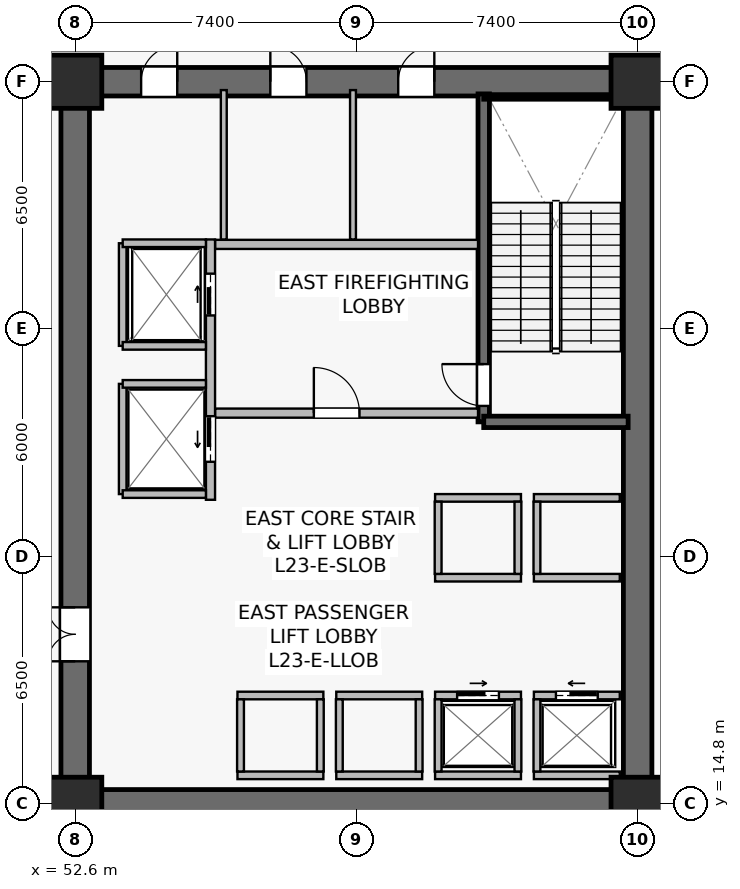
"""IFC4 building model, lengths in metres.
Left out: names, types, materials, properties, quantities, classifications, styles, units other than length and angle.
Written with IfcOpenShell. Run it as: python <this file> out.ifc"""

import sys

from ifc_helpers import new_model, si_unit, direction, frame, frame_2d, origin, origin_2d, place, context, subcontext, project, spatial, rectangle, extrude, source, transform, mapped, element, fill, save


model = new_model("IFC4")
c1 = context("Model", 3, precision=1e-05, world=origin(), true_north=direction((0.0, 1.0)))
c2 = subcontext(c1, "Body", "Model", "MODEL_VIEW")
j1 = project(units=[si_unit("LENGTHUNIT", "METRE"), si_unit("PLANEANGLEUNIT", "RADIAN")], contexts=[c1])
p1 = place(None, origin())
s1 = spatial("IfcSite", under=j1, at=p1, CompositionType="ELEMENT")
p2 = place(p1, origin())
s2 = spatial("IfcBuilding", under=s1, at=p2, CompositionType="ELEMENT")
p3 = place(p2, frame((0.0, 0.0, 94.9)))
s3 = spatial("IfcBuildingStorey", under=s2, at=p3, CompositionType="ELEMENT", Elevation=94.9)
p4 = place(p3, frame((52.225, 14.8, 0.0), z_axis=(0.0, 0.0, 1.0), x_axis=(1.0, 0.0, 0.0)))
e1 = element("IfcWall", 1, at=p4, inside=s3, PredefinedType="SHEAR", context=c2, shape_type="SweptSolid", body=[
    extrude(rectangle(XDim=15.55, YDim=0.75, at=frame_2d((7.775, 0.0))), origin(), (0.0, 0.0, 1.0), 5.09),
])
p5 = place(p3, frame((52.225, 33.8, 0.0), z_axis=(0.0, 0.0, 1.0), x_axis=(1.0, 0.0, 0.0)))
e2 = element("IfcWall", 2, at=p5, inside=s3, PredefinedType="SHEAR", context=c2, shape_type="SweptSolid", body=[
    extrude(rectangle(XDim=15.55, YDim=0.75, at=frame_2d((7.775, 0.0))), origin(), (0.0, 0.0, 1.0), 5.09),
])
p6 = place(p5, frame((8.875, 0.0, 0.0)))
e3 = element("IfcOpeningElement", 3, at=p6, cuts=e2, PredefinedType="OPENING", context=c2, shape_type="SweptSolid", body=[
    extrude(rectangle(XDim=0.95, YDim=2.15, at=frame_2d((0.475, 1.075))), frame((0.0, 0.385, 0.0), z_axis=(0.0, -1.0, 0.0), x_axis=(1.0, 0.0, 0.0)), (0.0, 0.0, 1.0), 0.77),
])
p7 = place(p5, frame((5.51, 0.0, 0.0)))
e4 = element("IfcOpeningElement", 4, at=p7, cuts=e2, PredefinedType="OPENING", context=c2, shape_type="SweptSolid", body=[
    extrude(rectangle(XDim=0.95, YDim=2.15, at=frame_2d((0.475, 1.075))), frame((0.0, 0.385, 0.0), z_axis=(0.0, -1.0, 0.0), x_axis=(1.0, 0.0, 0.0)), (0.0, 0.0, 1.0), 0.77),
])
p8 = place(p5, frame((2.11, 0.0, 0.0)))
e5 = element("IfcOpeningElement", 5, at=p8, cuts=e2, PredefinedType="OPENING", context=c2, shape_type="SweptSolid", body=[
    extrude(rectangle(XDim=0.95, YDim=2.15, at=frame_2d((0.475, 1.075))), frame((0.0, 0.385, 0.0), z_axis=(0.0, -1.0, 0.0), x_axis=(1.0, 0.0, 0.0)), (0.0, 0.0, 1.0), 0.77),
])
p9 = place(p3, frame((52.6, 15.175, 0.0), z_axis=(0.0, 0.0, 1.0), x_axis=(0.0, 1.0, 0.0)))
e6 = element("IfcWall", 6, at=p9, inside=s3, PredefinedType="SHEAR", context=c2, shape_type="SweptSolid", body=[
    extrude(rectangle(XDim=18.25, YDim=0.75, at=frame_2d((9.125, 0.0))), origin(), (0.0, 0.0, 1.0), 5.09),
])
p10 = place(p9, frame((3.375, 0.0, 0.0)))
e7 = element("IfcOpeningElement", 7, at=p10, cuts=e6, PredefinedType="OPENING", context=c2, shape_type="SweptSolid", body=[
    extrude(rectangle(XDim=1.42, YDim=2.2, at=frame_2d((0.71, 1.1))), frame((0.0, 0.385, 0.0), z_axis=(0.0, -1.0, 0.0), x_axis=(1.0, 0.0, 0.0)), (0.0, 0.0, 1.0), 0.77),
])
p11 = place(p3, frame((67.4, 15.175, 0.0), z_axis=(0.0, 0.0, 1.0), x_axis=(0.0, 1.0, 0.0)))
e8 = element("IfcWall", 8, at=p11, inside=s3, PredefinedType="SHEAR", context=c2, shape_type="SweptSolid", body=[
    extrude(rectangle(XDim=18.25, YDim=0.75, at=frame_2d((9.125, 0.0))), origin(), (0.0, 0.0, 1.0), 5.09),
])
p12 = place(p3, frame((63.35, 24.85, 0.0), z_axis=(0.0, 0.0, 1.0), x_axis=(0.0, 1.0, 0.0)))
e9 = element("IfcWall", 9, at=p12, inside=s3, PredefinedType="SHEAR", context=c2, shape_type="SweptSolid", body=[
    extrude(rectangle(XDim=8.63, YDim=0.3, at=frame_2d((4.315, 0.0))), origin(), (0.0, 0.0, 1.0), 5.09),
])
p13 = place(p12, frame((0.42, 0.0, 0.0)))
e10 = element("IfcOpeningElement", 10, at=p13, cuts=e9, PredefinedType="OPENING", context=c2, shape_type="SweptSolid", body=[
    extrude(rectangle(XDim=1.1, YDim=2.15, at=frame_2d((0.55, 1.075))), frame((0.0, 0.16, 0.0), z_axis=(0.0, -1.0, 0.0), x_axis=(1.0, 0.0, 0.0)), (0.0, 0.0, 1.0), 0.32),
])
p14 = place(p3, frame((63.35, 24.85, 0.0), z_axis=(0.0, 0.0, 1.0), x_axis=(1.0, 0.0, 0.0)))
e11 = element("IfcWall", 11, at=p14, inside=s3, PredefinedType="SHEAR", context=c2, shape_type="SweptSolid", body=[
    extrude(rectangle(XDim=3.8, YDim=0.3, at=frame_2d((1.9, 0.0))), origin(), (0.0, 0.0, 1.0), 5.09),
])
p15 = place(p3, frame((63.35, 33.4, 0.0), z_axis=(0.0, 0.0, 1.0), x_axis=(1.0, 0.0, 0.0)))
e12 = element("IfcWall", 12, at=p15, inside=s3, PredefinedType="SOLIDWALL", context=c2, shape_type="SweptSolid", body=[
    extrude(rectangle(XDim=3.72, YDim=0.12, at=frame_2d((1.86, 0.0))), origin(), (0.0, 0.0, 1.0), 5.09),
])
m1 = source(origin(), c2, "Body", "SweptSolid", [
    extrude(rectangle(XDim=1.4, YDim=1.4, at=origin_2d()), origin(), (0.0, 0.0, 1.0), 5.4),
])
for number, where, z_axis, x_axis in (
    (13, (52.6, 14.8, 0.0), (0.0, 0.0, 1.0), (1.0, 0.0, 0.0)),
    (14, (67.4, 14.8, 0.0), (0.0, 0.0, 1.0), (1.0, 0.0, 0.0)),
    (15, (52.6, 33.8, 0.0), (0.0, 0.0, 1.0), (1.0, 0.0, 0.0)),
    (16, (67.4, 33.8, 0.0), (0.0, 0.0, 1.0), (1.0, 0.0, 0.0)),
):
    element("IfcColumn", number, at=place(p3, frame(where, z_axis=z_axis, x_axis=x_axis)), inside=s3, PredefinedType="COLUMN", context=c2, shape_type="MappedRepresentation", body=[
        mapped(m1, transform((0.0, 0.0, 0.0), scale=1.0)),
    ])
p16 = place(p3, frame((56.28, 25.08, 0.0), z_axis=(0.0, 0.0, 1.0), x_axis=(1.0, 0.0, 0.0)))
e17 = element("IfcWall", 17, at=p16, inside=s3, PredefinedType="SOLIDWALL", context=c2, shape_type="SweptSolid", body=[
    extrude(rectangle(XDim=6.92, YDim=0.24, at=frame_2d((3.46, 0.0))), origin(), (0.0, 0.0, 1.0), 4.425),
])
p17 = place(p16, frame((2.6, 0.0, 0.0)))
e18 = element("IfcOpeningElement", 18, at=p17, cuts=e17, PredefinedType="OPENING", context=c2, shape_type="SweptSolid", body=[
    extrude(rectangle(XDim=1.2, YDim=2.16, at=frame_2d((0.6, 1.08))), frame((0.0, 0.13, 0.0), z_axis=(0.0, -1.0, 0.0), x_axis=(1.0, 0.0, 0.0)), (0.0, 0.0, 1.0), 0.26),
])
p18 = place(p3, frame((56.28, 29.52, 0.0), z_axis=(0.0, 0.0, 1.0), x_axis=(1.0, 0.0, 0.0)))
e19 = element("IfcWall", 19, at=p18, inside=s3, PredefinedType="SOLIDWALL", context=c2, shape_type="SweptSolid", body=[
    extrude(rectangle(XDim=6.92, YDim=0.24, at=frame_2d((3.46, 0.0))), origin(), (0.0, 0.0, 1.0), 4.425),
])
p19 = place(p3, frame((56.16, 22.8, 0.0), z_axis=(0.0, 0.0, 1.0), x_axis=(0.0, 1.0, 0.0)))
e20 = element("IfcWall", 20, at=p19, inside=s3, PredefinedType="SOLIDWALL", context=c2, shape_type="SweptSolid", body=[
    extrude(rectangle(XDim=6.85, YDim=0.24, at=frame_2d((3.425, 0.0))), origin(), (0.0, 0.0, 1.0), 4.175),
])
p20 = place(p19, frame((4.85, 0.0, 0.0)))
e21 = element("IfcOpeningElement", 21, at=p20, cuts=e20, PredefinedType="OPENING", context=c2, shape_type="SweptSolid", body=[
    extrude(rectangle(XDim=1.1, YDim=2.22, at=frame_2d((0.55, 1.11))), frame((0.0, 0.13, 0.0), z_axis=(0.0, -1.0, 0.0), x_axis=(1.0, 0.0, 0.0)), (0.0, 0.0, 1.0), 0.26),
])
p21 = place(p19, frame((1.0, 0.0, 0.0)))
e22 = element("IfcOpeningElement", 22, at=p21, cuts=e20, PredefinedType="OPENING", context=c2, shape_type="SweptSolid", body=[
    extrude(rectangle(XDim=1.2, YDim=2.22, at=frame_2d((0.6, 1.11))), frame((0.0, 0.13, 0.0), z_axis=(0.0, -1.0, 0.0), x_axis=(1.0, 0.0, 0.0)), (0.0, 0.0, 1.0), 0.26),
])
p22 = place(p3, frame((64.67, 17.65, 0.0), z_axis=(0.0, 0.0, 1.0), x_axis=(1.0, 0.0, 0.0)))
e23 = element("IfcWall", 23, at=p22, inside=s3, PredefinedType="SOLIDWALL", context=c2, shape_type="SweptSolid", body=[
    extrude(rectangle(XDim=2.26, YDim=0.2, at=frame_2d((1.13, 0.0))), origin(), (0.0, 0.0, 1.0), 5.09),
])
p23 = place(p22, frame((0.58, 0.0, 0.0)))
e24 = element("IfcOpeningElement", 24, at=p23, cuts=e23, PredefinedType="OPENING", context=c2, shape_type="SweptSolid", body=[
    extrude(rectangle(XDim=1.1, YDim=2.22, at=frame_2d((0.55, 1.11))), frame((0.0, 0.11, 0.0), z_axis=(0.0, -1.0, 0.0), x_axis=(1.0, 0.0, 0.0)), (0.0, 0.0, 1.0), 0.22),
])
p24 = place(p3, frame((64.67, 15.55, 0.0), z_axis=(0.0, 0.0, 1.0), x_axis=(1.0, 0.0, 0.0)))
e25 = element("IfcWall", 25, at=p24, inside=s3, PredefinedType="SOLIDWALL", context=c2, shape_type="SweptSolid", body=[
    extrude(rectangle(XDim=2.26, YDim=0.2, at=frame_2d((1.13, 0.0))), origin(), (0.0, 0.0, 1.0), 5.09),
])
p25 = place(p3, frame((64.75, 15.65, 0.0), z_axis=(0.0, 0.0, 1.0), x_axis=(0.0, 1.0, 0.0)))
e26 = element("IfcWall", 26, at=p25, inside=s3, PredefinedType="SOLIDWALL", context=c2, shape_type="SweptSolid", body=[
    extrude(rectangle(XDim=1.9, YDim=0.18, at=frame_2d((0.95, 0.0))), origin(), (0.0, 0.0, 1.0), 5.09),
])
p26 = place(p3, frame((62.07, 17.65, 0.0), z_axis=(0.0, 0.0, 1.0), x_axis=(1.0, 0.0, 0.0)))
e27 = element("IfcWall", 27, at=p26, inside=s3, PredefinedType="SOLIDWALL", context=c2, shape_type="SweptSolid", body=[
    extrude(rectangle(XDim=2.26, YDim=0.2, at=frame_2d((1.13, 0.0))), origin(), (0.0, 0.0, 1.0), 5.09),
])
p27 = place(p26, frame((0.58, 0.0, 0.0)))
e28 = element("IfcOpeningElement", 28, at=p27, cuts=e27, PredefinedType="OPENING", context=c2, shape_type="SweptSolid", body=[
    extrude(rectangle(XDim=1.1, YDim=2.22, at=frame_2d((0.55, 1.11))), frame((0.0, 0.11, 0.0), z_axis=(0.0, -1.0, 0.0), x_axis=(1.0, 0.0, 0.0)), (0.0, 0.0, 1.0), 0.22),
])
p28 = place(p3, frame((62.07, 15.55, 0.0), z_axis=(0.0, 0.0, 1.0), x_axis=(1.0, 0.0, 0.0)))
e29 = element("IfcWall", 29, at=p28, inside=s3, PredefinedType="SOLIDWALL", context=c2, shape_type="SweptSolid", body=[
    extrude(rectangle(XDim=2.26, YDim=0.2, at=frame_2d((1.13, 0.0))), origin(), (0.0, 0.0, 1.0), 5.09),
])
for number, where, z_axis, x_axis in (
    (30, (62.15, 15.65, 0.0), (0.0, 0.0, 1.0), (0.0, 1.0, 0.0)),
    (31, (64.25, 15.65, 0.0), (0.0, 0.0, 1.0), (0.0, 1.0, 0.0)),
):
    element("IfcWall", number, at=place(p3, frame(where, z_axis=z_axis, x_axis=x_axis)), inside=s3, PredefinedType="SOLIDWALL", context=c2, shape_type="SweptSolid", body=[
        extrude(rectangle(XDim=1.9, YDim=0.18, at=frame_2d((0.95, 0.0))), origin(), (0.0, 0.0, 1.0), 5.09),
    ])
for number, where, z_axis, x_axis in (
    (32, (59.47, 17.65, 0.0), (0.0, 0.0, 1.0), (1.0, 0.0, 0.0)),
    (33, (59.47, 15.55, 0.0), (0.0, 0.0, 1.0), (1.0, 0.0, 0.0)),
):
    element("IfcWall", number, at=place(p3, frame(where, z_axis=z_axis, x_axis=x_axis)), inside=s3, PredefinedType="SOLIDWALL", context=c2, shape_type="SweptSolid", body=[
        extrude(rectangle(XDim=2.26, YDim=0.2, at=frame_2d((1.13, 0.0))), origin(), (0.0, 0.0, 1.0), 4.425),
    ])
for number, where, z_axis, x_axis in (
    (34, (59.55, 15.65, 0.0), (0.0, 0.0, 1.0), (0.0, 1.0, 0.0)),
    (35, (61.65, 15.65, 0.0), (0.0, 0.0, 1.0), (0.0, 1.0, 0.0)),
):
    element("IfcWall", number, at=place(p3, frame(where, z_axis=z_axis, x_axis=x_axis)), inside=s3, PredefinedType="SOLIDWALL", context=c2, shape_type="SweptSolid", body=[
        extrude(rectangle(XDim=1.9, YDim=0.18, at=frame_2d((0.95, 0.0))), origin(), (0.0, 0.0, 1.0), 5.09),
    ])
for number, where, z_axis, x_axis in (
    (36, (56.87, 17.65, 0.0), (0.0, 0.0, 1.0), (1.0, 0.0, 0.0)),
    (37, (56.87, 15.55, 0.0), (0.0, 0.0, 1.0), (1.0, 0.0, 0.0)),
):
    element("IfcWall", number, at=place(p3, frame(where, z_axis=z_axis, x_axis=x_axis)), inside=s3, PredefinedType="SOLIDWALL", context=c2, shape_type="SweptSolid", body=[
        extrude(rectangle(XDim=2.26, YDim=0.2, at=frame_2d((1.13, 0.0))), origin(), (0.0, 0.0, 1.0), 5.09),
    ])
for number, where, z_axis, x_axis in (
    (38, (56.95, 15.65, 0.0), (0.0, 0.0, 1.0), (0.0, 1.0, 0.0)),
    (39, (59.05, 15.65, 0.0), (0.0, 0.0, 1.0), (0.0, 1.0, 0.0)),
):
    element("IfcWall", number, at=place(p3, frame(where, z_axis=z_axis, x_axis=x_axis)), inside=s3, PredefinedType="SOLIDWALL", context=c2, shape_type="SweptSolid", body=[
        extrude(rectangle(XDim=1.9, YDim=0.18, at=frame_2d((0.95, 0.0))), origin(), (0.0, 0.0, 1.0), 5.09),
    ])
for number, where, z_axis, x_axis in (
    (40, (64.67, 20.75, 0.0), (0.0, 0.0, 1.0), (1.0, 0.0, 0.0)),
    (41, (64.67, 22.85, 0.0), (0.0, 0.0, 1.0), (1.0, 0.0, 0.0)),
):
    element("IfcWall", number, at=place(p3, frame(where, z_axis=z_axis, x_axis=x_axis)), inside=s3, PredefinedType="SOLIDWALL", context=c2, shape_type="SweptSolid", body=[
        extrude(rectangle(XDim=2.26, YDim=0.2, at=frame_2d((1.13, 0.0))), origin(), (0.0, 0.0, 1.0), 5.09),
    ])
p29 = place(p3, frame((64.75, 20.85, 0.0), z_axis=(0.0, 0.0, 1.0), x_axis=(0.0, 1.0, 0.0)))
e42 = element("IfcWall", 42, at=p29, inside=s3, PredefinedType="SOLIDWALL", context=c2, shape_type="SweptSolid", body=[
    extrude(rectangle(XDim=1.9, YDim=0.18, at=frame_2d((0.95, 0.0))), origin(), (0.0, 0.0, 1.0), 5.09),
])
for number, where, z_axis, x_axis in (
    (43, (62.07, 20.75, 0.0), (0.0, 0.0, 1.0), (1.0, 0.0, 0.0)),
    (44, (62.07, 22.85, 0.0), (0.0, 0.0, 1.0), (1.0, 0.0, 0.0)),
):
    element("IfcWall", number, at=place(p3, frame(where, z_axis=z_axis, x_axis=x_axis)), inside=s3, PredefinedType="SOLIDWALL", context=c2, shape_type="SweptSolid", body=[
        extrude(rectangle(XDim=2.26, YDim=0.2, at=frame_2d((1.13, 0.0))), origin(), (0.0, 0.0, 1.0), 5.09),
    ])
for number, where, z_axis, x_axis in (
    (45, (62.15, 20.85, 0.0), (0.0, 0.0, 1.0), (0.0, 1.0, 0.0)),
    (46, (64.25, 20.85, 0.0), (0.0, 0.0, 1.0), (0.0, 1.0, 0.0)),
):
    element("IfcWall", number, at=place(p3, frame(where, z_axis=z_axis, x_axis=x_axis)), inside=s3, PredefinedType="SOLIDWALL", context=c2, shape_type="SweptSolid", body=[
        extrude(rectangle(XDim=1.9, YDim=0.18, at=frame_2d((0.95, 0.0))), origin(), (0.0, 0.0, 1.0), 5.09),
    ])
p30 = place(p3, frame((53.85, 26.85, 0.0), z_axis=(0.0, 0.0, 1.0), x_axis=(0.0, 1.0, 0.0)))
e47 = element("IfcWall", 47, at=p30, inside=s3, PredefinedType="SOLIDWALL", context=c2, shape_type="SweptSolid", body=[
    extrude(rectangle(XDim=2.7, YDim=0.2, at=frame_2d((1.35, 0.0))), origin(), (0.0, 0.0, 1.0), 5.09),
])
p31 = place(p3, frame((53.85, 29.55, 0.0), z_axis=(0.0, 0.0, 1.0), x_axis=(1.0, 0.0, 0.0)))
e48 = element("IfcWall", 48, at=p31, inside=s3, PredefinedType="SOLIDWALL", context=c2, shape_type="SweptSolid", body=[
    extrude(rectangle(XDim=2.19, YDim=0.2, at=frame_2d((1.095, 0.0))), origin(), (0.0, 0.0, 1.0), 5.09),
])
p32 = place(p3, frame((53.85, 26.85, 0.0), z_axis=(0.0, 0.0, 1.0), x_axis=(1.0, 0.0, 0.0)))
e49 = element("IfcWall", 49, at=p32, inside=s3, PredefinedType="SOLIDWALL", context=c2, shape_type="SweptSolid", body=[
    extrude(rectangle(XDim=2.19, YDim=0.2, at=frame_2d((1.095, 0.0))), origin(), (0.0, 0.0, 1.0), 4.487),
])
p33 = place(p3, frame((53.85, 22.95, 0.0), z_axis=(0.0, 0.0, 1.0), x_axis=(0.0, 1.0, 0.0)))
e50 = element("IfcWall", 50, at=p33, inside=s3, PredefinedType="SOLIDWALL", context=c2, shape_type="SweptSolid", body=[
    extrude(rectangle(XDim=2.9, YDim=0.2, at=frame_2d((1.45, 0.0))), origin(), (0.0, 0.0, 1.0), 4.175),
])
for number, where, z_axis, x_axis in (
    (51, (53.85, 25.85, 0.0), (0.0, 0.0, 1.0), (1.0, 0.0, 0.0)),
    (52, (53.85, 22.95, 0.0), (0.0, 0.0, 1.0), (1.0, 0.0, 0.0)),
):
    element("IfcWall", number, at=place(p3, frame(where, z_axis=z_axis, x_axis=x_axis)), inside=s3, PredefinedType="SOLIDWALL", context=c2, shape_type="SweptSolid", body=[
        extrude(rectangle(XDim=2.19, YDim=0.2, at=frame_2d((1.095, 0.0))), origin(), (0.0, 0.0, 1.0), 5.09),
    ])
p34 = place(p3, frame((59.91, 29.65, 0.0), z_axis=(0.0, 0.0, 1.0), x_axis=(0.0, 1.0, 0.0)))
e53 = element("IfcWall", 53, at=p34, inside=s3, PredefinedType="PLUMBINGWALL", context=c2, shape_type="SweptSolid", body=[
    extrude(rectangle(XDim=3.93, YDim=0.155, at=frame_2d((1.965, 0.0))), origin(), (0.0, 0.0, 1.0), 4.425),
])
p35 = place(p3, frame((56.51, 29.65, 0.0), z_axis=(0.0, 0.0, 1.0), x_axis=(0.0, 1.0, 0.0)))
e54 = element("IfcWall", 54, at=p35, inside=s3, PredefinedType="PLUMBINGWALL", context=c2, shape_type="SweptSolid", body=[
    extrude(rectangle(XDim=3.93, YDim=0.155, at=frame_2d((1.965, 0.0))), origin(), (0.0, 0.0, 1.0), 5.09),
])
m2 = source(origin(), c2, "Body", "SweptSolid", [
    extrude(rectangle(XDim=1.1, YDim=2.15, at=frame_2d((0.55, 1.075))), frame((0.0, 0.025, 0.0), z_axis=(0.0, -1.0, 0.0), x_axis=(1.0, 0.0, 0.0)), (0.0, 0.0, 1.0), 0.05),
])
p36 = place(p13, origin())
e55 = element("IfcDoor", 55, at=p36, inside=s3, OperationType="SINGLE_SWING_RIGHT", PredefinedType="DOOR", context=c2, shape_type="MappedRepresentation", body=[
    mapped(m2, transform((0.0, 0.0, 0.0), scale=1.0)),
])
fill(e10, e55)
m3 = source(origin(), c2, "Body", "SweptSolid", [
    extrude(rectangle(XDim=1.2, YDim=2.16, at=frame_2d((0.6, 1.08))), frame((0.0, 0.025, 0.0), z_axis=(0.0, -1.0, 0.0), x_axis=(1.0, 0.0, 0.0)), (0.0, 0.0, 1.0), 0.05),
])
p37 = place(p17, origin())
e56 = element("IfcDoor", 56, at=p37, inside=s3, OperationType="SINGLE_SWING_LEFT", PredefinedType="DOOR", context=c2, shape_type="MappedRepresentation", body=[
    mapped(m3, transform((0.0, 0.0, 0.0), scale=1.0)),
])
fill(e18, e56)
m4 = source(origin(), c2, "Body", "SweptSolid", [
    extrude(rectangle(XDim=1.1, YDim=2.22, at=frame_2d((0.55, 1.11))), frame((0.0, 0.025, 0.0), z_axis=(0.0, -1.0, 0.0), x_axis=(1.0, 0.0, 0.0)), (0.0, 0.0, 1.0), 0.05),
])
p38 = place(p23, origin())
e57 = element("IfcDoor", 57, at=p38, inside=s3, OperationType="SLIDING_TO_LEFT", PredefinedType="USERDEFINED", context=c2, shape_type="MappedRepresentation", body=[
    mapped(m4, transform((0.0, 0.0, 0.0), scale=1.0)),
])
fill(e24, e57)
p39 = place(p27, origin())
e58 = element("IfcDoor", 58, at=p39, inside=s3, OperationType="SLIDING_TO_RIGHT", PredefinedType="USERDEFINED", context=c2, shape_type="MappedRepresentation", body=[
    mapped(m4, transform((0.0, 0.0, 0.0), scale=1.0)),
])
fill(e28, e58)
p40 = place(p20, origin())
e59 = element("IfcDoor", 59, at=p40, inside=s3, OperationType="SLIDING_TO_RIGHT", PredefinedType="USERDEFINED", context=c2, shape_type="MappedRepresentation", body=[
    mapped(m4, transform((0.0, 0.0, 0.0), scale=1.0)),
])
fill(e21, e59)
m5 = source(origin(), c2, "Body", "SweptSolid", [
    extrude(rectangle(XDim=1.2, YDim=2.22, at=frame_2d((0.6, 1.11))), frame((0.0, 0.025, 0.0), z_axis=(0.0, -1.0, 0.0), x_axis=(1.0, 0.0, 0.0)), (0.0, 0.0, 1.0), 0.05),
])
p41 = place(p21, origin())
e60 = element("IfcDoor", 60, at=p41, inside=s3, OperationType="SLIDING_TO_LEFT", PredefinedType="USERDEFINED", context=c2, shape_type="MappedRepresentation", body=[
    mapped(m5, transform((0.0, 0.0, 0.0), scale=1.0)),
])
fill(e22, e60)
m6 = source(origin(), c2, "Body", "SweptSolid", [
    extrude(rectangle(XDim=1.42, YDim=2.2, at=frame_2d((0.71, 1.1))), frame((0.0, 0.025, 0.0), z_axis=(0.0, -1.0, 0.0), x_axis=(1.0, 0.0, 0.0)), (0.0, 0.0, 1.0), 0.05),
])
p42 = place(p10, origin())
e61 = element("IfcDoor", 61, at=p42, inside=s3, OperationType="DOUBLE_DOOR_SINGLE_SWING", PredefinedType="DOOR", context=c2, shape_type="MappedRepresentation", body=[
    mapped(m6, transform((0.0, 0.0, 0.0), scale=1.0)),
])
fill(e7, e61)
m7 = source(origin(), c2, "Body", "SweptSolid", [
    extrude(rectangle(XDim=0.95, YDim=2.15, at=frame_2d((0.475, 1.075))), frame((0.0, 0.025, 0.0), z_axis=(0.0, -1.0, 0.0), x_axis=(1.0, 0.0, 0.0)), (0.0, 0.0, 1.0), 0.05),
])
p43 = place(p6, origin())
e62 = element("IfcDoor", 62, at=p43, inside=s3, OperationType="SINGLE_SWING_RIGHT", PredefinedType="DOOR", context=c2, shape_type="MappedRepresentation", body=[
    mapped(m7, transform((0.0, 0.0, 0.0), scale=1.0)),
])
fill(e3, e62)
p44 = place(p7, origin())
e63 = element("IfcDoor", 63, at=p44, inside=s3, OperationType="SINGLE_SWING_LEFT", PredefinedType="DOOR", context=c2, shape_type="MappedRepresentation", body=[
    mapped(m7, transform((0.0, 0.0, 0.0), scale=1.0)),
])
fill(e4, e63)
p45 = place(p8, origin())
e64 = element("IfcDoor", 64, at=p45, inside=s3, OperationType="SINGLE_SWING_RIGHT", PredefinedType="DOOR", context=c2, shape_type="MappedRepresentation", body=[
    mapped(m7, transform((0.0, 0.0, 0.0), scale=1.0)),
])
fill(e5, e64)
save(model, sys.argv[1])
